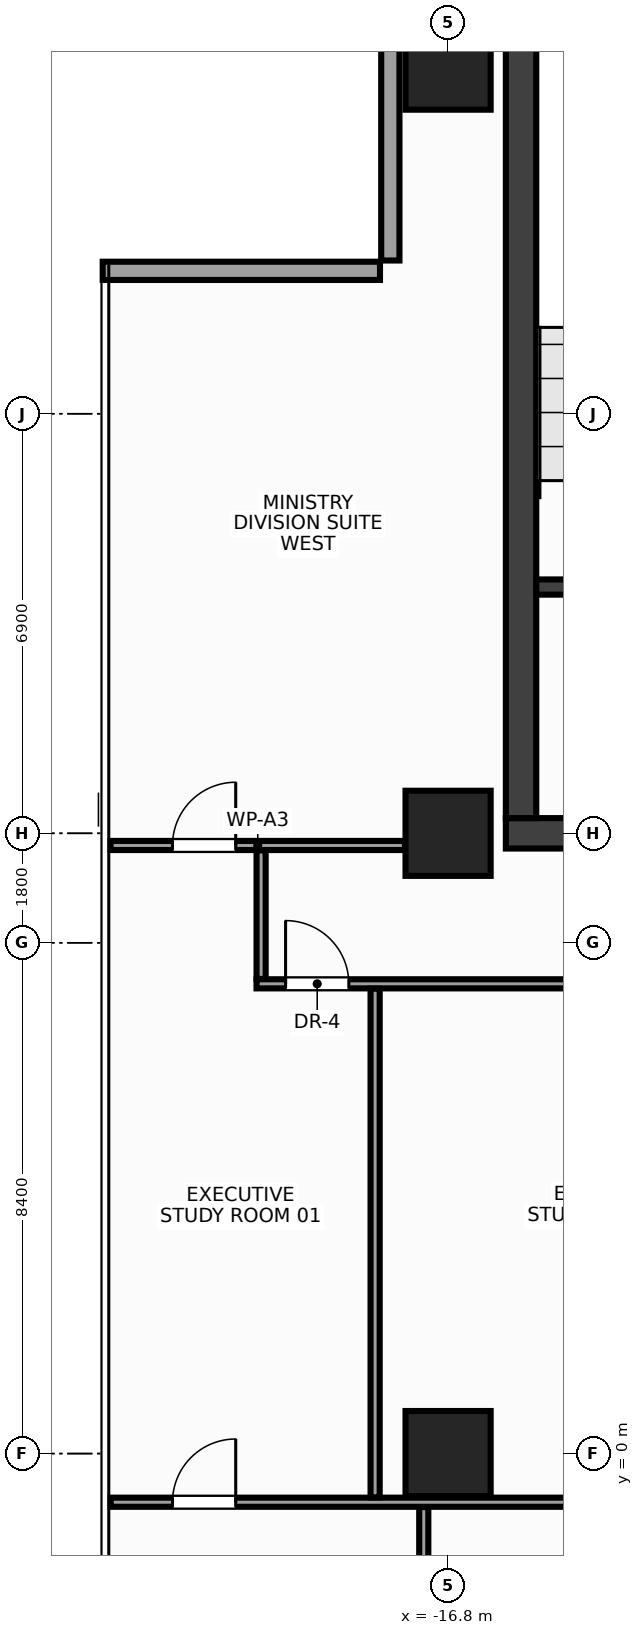
"""IFC4 building model, lengths in metres.
Left out: names, types, materials, properties, quantities, classifications, styles, units other than length and angle.
Written with IfcOpenShell. Run it as: python <this file> out.ifc"""

import sys

from ifc_helpers import new_model, si_unit, direction, frame, frame_2d, origin, origin_2d, place, context, subcontext, project, spatial, rectangle, extrude, source, transform, mapped, element, fill, save


model = new_model("IFC4")
c1 = context("Model", 3, precision=1e-05, world=origin(), true_north=direction((0.0, 1.0)))
c2 = subcontext(c1, "Body", "Model", "MODEL_VIEW")
j1 = project(units=[si_unit("LENGTHUNIT", "METRE"), si_unit("PLANEANGLEUNIT", "RADIAN")], contexts=[c1])
p1 = place(None, origin())
s1 = spatial("IfcSite", under=j1, at=p1, CompositionType="ELEMENT")
p2 = place(p1, origin())
s2 = spatial("IfcBuilding", under=s1, at=p2, CompositionType="ELEMENT")
p3 = place(p2, frame((0.0, 0.0, 250.4)))
s3 = spatial("IfcBuildingStorey", under=s2, at=p3, CompositionType="ELEMENT", Elevation=250.4)
m1 = source(origin(), c2, "Body", "SweptSolid", [
    extrude(rectangle(XDim=31.7, YDim=0.5, at=frame_2d((15.85, 0.0))), origin(), (0.0, 0.0, 1.0), 3.6),
])
p4 = place(p3, frame((-15.85, 10.2, 0.0), z_axis=(0.0, 0.0, 1.0), x_axis=(1.0, 0.0, 0.0)))
e1 = element("IfcWall", 1, at=p4, inside=s3, PredefinedType="SHEAR", context=c2, shape_type="MappedRepresentation", body=[
    mapped(m1, transform((0.0, 0.0, 0.0), x_axis=(1.0, 0.0, 0.0), y_axis=(0.0, 1.0, 0.0), z_axis=(0.0, 0.0, 1.0), scale=1.0)),
])
p5 = place(p4, frame((1.7, 0.0, 0.0)))
e2 = element("IfcOpeningElement", 2, at=p5, cuts=e1, PredefinedType="OPENING", context=c2, shape_type="SweptSolid", body=[
    extrude(rectangle(XDim=1.6, YDim=2.15, at=frame_2d((0.8, 1.075))), frame((0.0, 0.262, 0.0), z_axis=(0.0, -1.0, 0.0), x_axis=(1.0, 0.0, 0.0)), (0.0, 0.0, 1.0), 0.524),
])
p6 = place(p4, frame((28.4, 0.0, 0.0)))
e3 = element("IfcOpeningElement", 3, at=p6, cuts=e1, PredefinedType="OPENING", context=c2, shape_type="SweptSolid", body=[
    extrude(rectangle(XDim=1.6, YDim=2.15, at=frame_2d((0.8, 1.075))), frame((0.0, 0.262, 0.0), z_axis=(0.0, -1.0, 0.0), x_axis=(1.0, 0.0, 0.0)), (0.0, 0.0, 1.0), 0.524),
])
p7 = place(p4, frame((15.1, 0.0, 0.0)))
e4 = element("IfcOpeningElement", 4, at=p7, cuts=e1, PredefinedType="OPENING", context=c2, shape_type="SweptSolid", body=[
    extrude(rectangle(XDim=1.5, YDim=2.2, at=frame_2d((0.75, 1.1))), frame((0.0, 0.262, 0.0), z_axis=(0.0, -1.0, 0.0), x_axis=(1.0, 0.0, 0.0)), (0.0, 0.0, 1.0), 0.524),
])
m2 = source(origin(), c2, "Body", "SweptSolid", [
    extrude(rectangle(XDim=13.1, YDim=0.5, at=frame_2d((6.55, 0.0))), origin(), (0.0, 0.0, 1.0), 3.6),
])
p8 = place(p3, frame((-15.6, 10.45, 0.0), z_axis=(0.0, 0.0, 1.0), x_axis=(0.0, 1.0, 0.0)))
e5 = element("IfcWall", 5, at=p8, inside=s3, PredefinedType="SHEAR", context=c2, shape_type="MappedRepresentation", body=[
    mapped(m2, transform((0.0, 0.0, 0.0), x_axis=(1.0, 0.0, 0.0), y_axis=(0.0, 1.0, 0.0), z_axis=(0.0, 0.0, 1.0), scale=1.0)),
])
m3 = source(origin(), c2, "Body", "SweptSolid", [
    extrude(rectangle(XDim=3.705, YDim=0.25, at=frame_2d((1.853, 0.0))), origin(), (0.0, 0.0, 1.0), 3.6),
])
p9 = place(p3, frame((-15.35, 14.25, 0.0), z_axis=(0.0, 0.0, 1.0), x_axis=(1.0, 0.0, 0.0)))
e6 = element("IfcWall", 6, at=p9, inside=s3, PredefinedType="SHEAR", context=c2, shape_type="MappedRepresentation", body=[
    mapped(m3, transform((0.0, 0.0, 0.0), x_axis=(1.0, 0.0, 0.0), y_axis=(0.0, 1.0, 0.0), z_axis=(0.0, 0.0, 1.0), scale=1.0)),
])
p10 = place(p9, frame((0.95, 0.0, 0.0)))
e7 = element("IfcOpeningElement", 7, at=p10, cuts=e6, PredefinedType="OPENING", context=c2, shape_type="SweptSolid", body=[
    extrude(rectangle(XDim=1.6, YDim=2.15, at=frame_2d((0.8, 1.075))), frame((0.0, 0.137, 0.0), z_axis=(0.0, -1.0, 0.0), x_axis=(1.0, 0.0, 0.0)), (0.0, 0.0, 1.0), 0.274),
])
m4 = source(origin(), c2, "Body", "SweptSolid", [
    extrude(rectangle(XDim=1.4, YDim=1.4, at=origin_2d()), origin(), (0.0, 0.0, 1.0), 3.6),
])
for number, where, z_axis, x_axis in (
    (8, (-16.8, 0.0, 0.0), (0.0, 0.0, 1.0), (1.0, 0.0, 0.0)),
    (9, (-16.8, 10.2, 0.0), (0.0, 0.0, 1.0), (1.0, 0.0, 0.0)),
    (10, (-16.8, 22.8, 0.0), (0.0, 0.0, 1.0), (1.0, 0.0, 0.0)),
):
    element("IfcColumn", number, at=place(p3, frame(where, z_axis=z_axis, x_axis=x_axis)), inside=s3, PredefinedType="COLUMN", context=c2, shape_type="MappedRepresentation", body=[
        mapped(m4, transform((0.0, 0.0, 0.0), x_axis=(1.0, 0.0, 0.0), y_axis=(0.0, 1.0, 0.0), z_axis=(0.0, 0.0, 1.0), scale=1.0)),
    ])
m5 = source(origin(), c2, "Body", "SweptSolid", [
    extrude(rectangle(XDim=4.56, YDim=0.3, at=frame_2d((2.28, 0.0))), origin(), (0.0, 0.0, 1.0), 2.75),
])
p11 = place(p3, frame((-17.75, 24.18, 0.0), z_axis=(0.0, 0.0, 1.0), x_axis=(0.0, -1.0, 0.0)))
e11 = element("IfcWall", 11, at=p11, inside=s3, PredefinedType="STANDARD", context=c2, shape_type="MappedRepresentation", body=[
    mapped(m5, transform((0.0, 0.0, 0.0), x_axis=(1.0, 0.0, 0.0), y_axis=(0.0, 1.0, 0.0), z_axis=(0.0, 0.0, 1.0), scale=1.0)),
])
m6 = source(origin(), c2, "Body", "SweptSolid", [
    extrude(rectangle(XDim=4.56, YDim=0.3, at=frame_2d((2.28, 0.0))), origin(), (0.0, 0.0, 1.0), 2.75),
])
p12 = place(p3, frame((-17.92, 19.45, 0.0), z_axis=(0.0, 0.0, 1.0), x_axis=(-1.0, 0.0, 0.0)))
e12 = element("IfcWall", 12, at=p12, inside=s3, PredefinedType="STANDARD", context=c2, shape_type="MappedRepresentation", body=[
    mapped(m6, transform((0.0, 0.0, 0.0), x_axis=(1.0, 0.0, 0.0), y_axis=(0.0, 1.0, 0.0), z_axis=(0.0, 0.0, 1.0), scale=1.0)),
])
m7 = source(origin(), c2, "Body", "SweptSolid", [
    extrude(rectangle(XDim=4.84, YDim=0.15, at=frame_2d((2.42, 0.0))), origin(), (0.0, 0.0, 1.0), 3.37),
])
p13 = place(p3, frame((-22.35, 10.0, 0.0), z_axis=(0.0, 0.0, 1.0), x_axis=(1.0, 0.0, 0.0)))
e13 = element("IfcWall", 13, at=p13, inside=s3, PredefinedType="PARTITIONING", context=c2, shape_type="MappedRepresentation", body=[
    mapped(m7, transform((0.0, 0.0, 0.0), x_axis=(1.0, 0.0, 0.0), y_axis=(0.0, 1.0, 0.0), z_axis=(0.0, 0.0, 1.0), scale=1.0)),
])
p14 = place(p13, frame((1.018, 0.0, 0.0)))
e14 = element("IfcOpeningElement", 14, at=p14, cuts=e13, PredefinedType="OPENING", context=c2, shape_type="SweptSolid", body=[
    extrude(rectangle(XDim=1.04, YDim=2.2, at=frame_2d((0.52, 1.1))), frame((0.0, 0.087, 0.0), z_axis=(0.0, -1.0, 0.0), x_axis=(1.0, 0.0, 0.0)), (0.0, 0.0, 1.0), 0.174),
])
m8 = source(origin(), c2, "Body", "SweptSolid", [
    extrude(rectangle(XDim=15.6, YDim=0.15, at=frame_2d((7.8, 0.0))), origin(), (0.0, 0.0, 1.0), 2.755),
])
p15 = place(p3, frame((-19.95, 7.725, 0.0), z_axis=(0.0, 0.0, 1.0), x_axis=(1.0, 0.0, 0.0)))
e15 = element("IfcWall", 15, at=p15, inside=s3, PredefinedType="PARTITIONING", context=c2, shape_type="MappedRepresentation", body=[
    mapped(m8, transform((0.0, 0.0, 0.0), x_axis=(1.0, 0.0, 0.0), y_axis=(0.0, 1.0, 0.0), z_axis=(0.0, 0.0, 1.0), scale=1.0)),
])
p16 = place(p15, frame((0.478, 0.0, 0.0)))
e16 = element("IfcOpeningElement", 16, at=p16, cuts=e15, PredefinedType="OPENING", context=c2, shape_type="SweptSolid", body=[
    extrude(rectangle(XDim=1.04, YDim=2.2, at=frame_2d((0.52, 1.1))), frame((0.0, 0.087, 0.0), z_axis=(0.0, -1.0, 0.0), x_axis=(1.0, 0.0, 0.0)), (0.0, 0.0, 1.0), 0.174),
])
p17 = place(p15, frame((5.63, 0.0, 0.0)))
e17 = element("IfcOpeningElement", 17, at=p17, cuts=e15, PredefinedType="OPENING", context=c2, shape_type="SweptSolid", body=[
    extrude(rectangle(XDim=1.04, YDim=2.2, at=frame_2d((0.52, 1.1))), frame((0.0, 0.087, 0.0), z_axis=(0.0, -1.0, 0.0), x_axis=(1.0, 0.0, 0.0)), (0.0, 0.0, 1.0), 0.174),
])
p18 = place(p15, frame((12.433, 0.0, 0.0)))
e18 = element("IfcOpeningElement", 18, at=p18, cuts=e15, PredefinedType="OPENING", context=c2, shape_type="SweptSolid", body=[
    extrude(rectangle(XDim=1.04, YDim=2.2, at=frame_2d((0.52, 1.1))), frame((0.0, 0.087, 0.0), z_axis=(0.0, -1.0, 0.0), x_axis=(1.0, 0.0, 0.0)), (0.0, 0.0, 1.0), 0.174),
])
m9 = source(origin(), c2, "Body", "SweptSolid", [
    extrude(rectangle(XDim=2.115, YDim=0.15, at=frame_2d((1.058, 0.0))), origin(), (0.0, 0.0, 1.0), 3.37),
])
p19 = place(p3, frame((-19.875, 7.805, 0.0), z_axis=(0.0, 0.0, 1.0), x_axis=(0.0, 1.0, 0.0)))
e19 = element("IfcWall", 19, at=p19, inside=s3, PredefinedType="PARTITIONING", context=c2, shape_type="MappedRepresentation", body=[
    mapped(m9, transform((0.0, 0.0, 0.0), x_axis=(1.0, 0.0, 0.0), y_axis=(0.0, 1.0, 0.0), z_axis=(0.0, 0.0, 1.0), scale=1.0)),
])
m10 = source(origin(), c2, "Body", "SweptSolid", [
    extrude(rectangle(XDim=17.995, YDim=0.15, at=frame_2d((8.998, 0.0))), origin(), (0.0, 0.0, 1.0), 2.755),
])
p20 = place(p3, frame((-22.35, -0.8, 0.0), z_axis=(0.0, 0.0, 1.0), x_axis=(1.0, 0.0, 0.0)))
e20 = element("IfcWall", 20, at=p20, inside=s3, PredefinedType="PARTITIONING", context=c2, shape_type="MappedRepresentation", body=[
    mapped(m10, transform((0.0, 0.0, 0.0), x_axis=(1.0, 0.0, 0.0), y_axis=(0.0, 1.0, 0.0), z_axis=(0.0, 0.0, 1.0), scale=1.0)),
])
p21 = place(p20, frame((1.018, 0.0, 0.0)))
e21 = element("IfcOpeningElement", 21, at=p21, cuts=e20, PredefinedType="OPENING", context=c2, shape_type="SweptSolid", body=[
    extrude(rectangle(XDim=1.04, YDim=2.2, at=frame_2d((0.52, 1.1))), frame((0.0, 0.087, 0.0), z_axis=(0.0, -1.0, 0.0), x_axis=(1.0, 0.0, 0.0)), (0.0, 0.0, 1.0), 0.174),
])
p22 = place(p20, frame((8.03, 0.0, 0.0)))
e22 = element("IfcOpeningElement", 22, at=p22, cuts=e20, PredefinedType="OPENING", context=c2, shape_type="SweptSolid", body=[
    extrude(rectangle(XDim=1.04, YDim=2.2, at=frame_2d((0.52, 1.1))), frame((0.0, 0.087, 0.0), z_axis=(0.0, -1.0, 0.0), x_axis=(1.0, 0.0, 0.0)), (0.0, 0.0, 1.0), 0.174),
])
m11 = source(origin(), c2, "Body", "SweptSolid", [
    extrude(rectangle(XDim=8.365, YDim=0.15, at=frame_2d((4.183, 0.0))), origin(), (0.0, 0.0, 1.0), 3.37),
])
p23 = place(p3, frame((-18.0, -0.72, 0.0), z_axis=(0.0, 0.0, 1.0), x_axis=(0.0, 1.0, 0.0)))
e23 = element("IfcWall", 23, at=p23, inside=s3, PredefinedType="PARTITIONING", context=c2, shape_type="MappedRepresentation", body=[
    mapped(m11, transform((0.0, 0.0, 0.0), x_axis=(1.0, 0.0, 0.0), y_axis=(0.0, 1.0, 0.0), z_axis=(0.0, 0.0, 1.0), scale=1.0)),
])
m12 = source(origin(), c2, "Body", "SweptSolid", [
    extrude(rectangle(XDim=9.21, YDim=0.15, at=frame_2d((4.605, 0.0))), origin(), (0.0, 0.0, 1.0), 3.37),
])
p24 = place(p3, frame((-17.2, -10.09, 0.0), z_axis=(0.0, 0.0, 1.0), x_axis=(0.0, 1.0, 0.0)))
e24 = element("IfcWall", 24, at=p24, inside=s3, PredefinedType="PARTITIONING", context=c2, shape_type="MappedRepresentation", body=[
    mapped(m12, transform((0.0, 0.0, 0.0), x_axis=(1.0, 0.0, 0.0), y_axis=(0.0, 1.0, 0.0), z_axis=(0.0, 0.0, 1.0), scale=1.0)),
])
m13 = source(origin(), c2, "Body", "SweptSolid", [
    extrude(rectangle(XDim=1.04, YDim=2.2, at=frame_2d((0.52, 1.1))), frame((0.0, 0.025, 0.0), z_axis=(0.0, -1.0, 0.0), x_axis=(1.0, 0.0, 0.0)), (0.0, 0.0, 1.0), 0.05),
])
p25 = place(p16, origin())
e25 = element("IfcDoor", 25, at=p25, inside=s3, OperationType="SINGLE_SWING_LEFT", PredefinedType="DOOR", context=c2, shape_type="MappedRepresentation", body=[
    mapped(m13, transform((0.0, 0.0, 0.0), x_axis=(1.0, 0.0, 0.0), y_axis=(0.0, 1.0, 0.0), z_axis=(0.0, 0.0, 1.0), scale=1.0)),
])
fill(e16, e25)
p26 = place(p14, origin())
e26 = element("IfcDoor", 26, at=p26, inside=s3, OperationType="SINGLE_SWING_RIGHT", PredefinedType="DOOR", context=c2, shape_type="MappedRepresentation", body=[
    mapped(m13, transform((0.0, 0.0, 0.0), x_axis=(1.0, 0.0, 0.0), y_axis=(0.0, 1.0, 0.0), z_axis=(0.0, 0.0, 1.0), scale=1.0)),
])
fill(e14, e26)
p27 = place(p21, origin())
e27 = element("IfcDoor", 27, at=p27, inside=s3, OperationType="SINGLE_SWING_RIGHT", PredefinedType="DOOR", context=c2, shape_type="MappedRepresentation", body=[
    mapped(m13, transform((0.0, 0.0, 0.0), x_axis=(1.0, 0.0, 0.0), y_axis=(0.0, 1.0, 0.0), z_axis=(0.0, 0.0, 1.0), scale=1.0)),
])
fill(e21, e27)
save(model, sys.argv[1])
